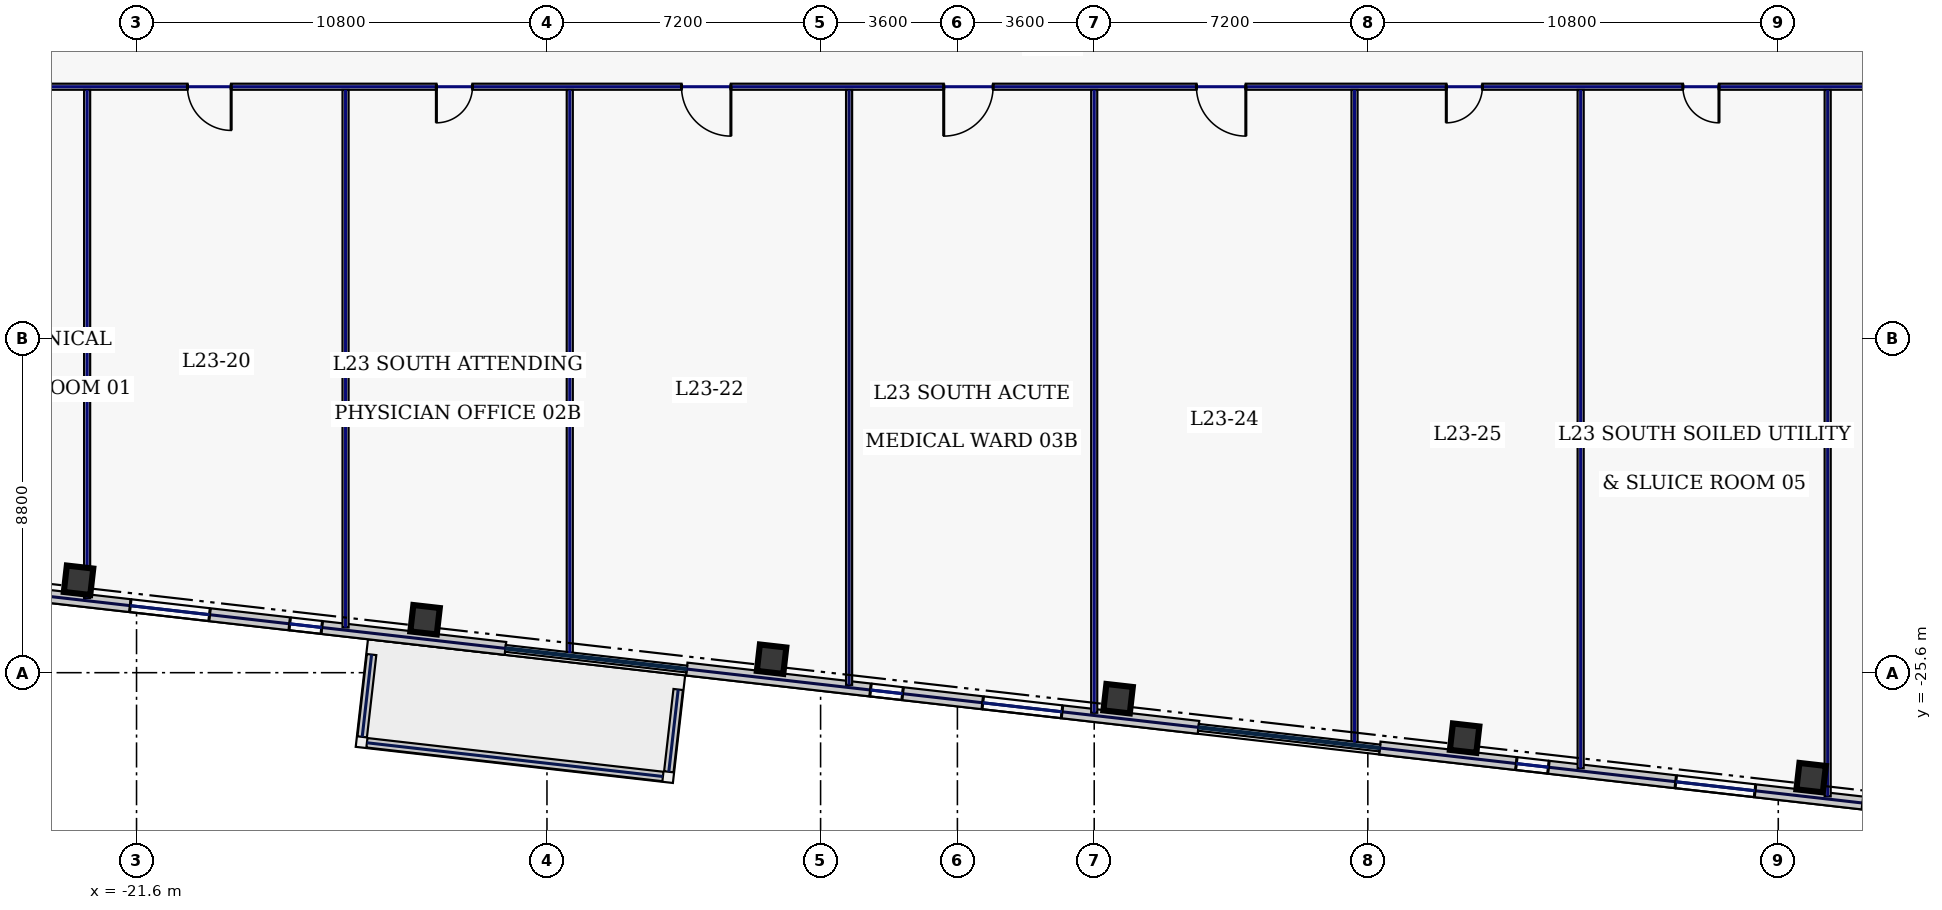
"""IFC4 building model, lengths in metres.
Left out: names, types, materials, properties, quantities, classifications, styles, units other than length and angle.
Written with IfcOpenShell. Run it as: python <this file> out.ifc"""

import sys

from ifc_helpers import new_model, si_unit, direction, frame, frame_2d, origin, origin_2d, place, context, subcontext, project, spatial, rectangle, hollow_rectangle, extrude, element, fill, save


model = new_model("IFC4")
c1 = context("Model", 3, precision=1e-05, world=origin(), true_north=direction((0.0, 1.0)))
c2 = subcontext(c1, "Body", "Model", "MODEL_VIEW")
j1 = project(units=[si_unit("LENGTHUNIT", "METRE"), si_unit("PLANEANGLEUNIT", "RADIAN")], contexts=[c1])
p1 = place(None, origin())
s1 = spatial("IfcSite", under=j1, at=p1, CompositionType="ELEMENT")
p2 = place(p1, origin())
s2 = spatial("IfcBuilding", under=s1, at=p2, CompositionType="ELEMENT")
p3 = place(p2, frame((0.0, 0.0, 105.4)))
s3 = spatial("IfcBuildingStorey", under=s2, at=p3, CompositionType="ELEMENT", Elevation=105.4)
for number, where, z_axis, x_axis in (
    (1, (-23.126, -23.168, 0.0), (0.0, 0.0, 1.0), (0.994, -0.113, 0.0)),
    (2, (-14.008, -24.207, 0.0), (0.0, 0.0, 1.0), (0.994, -0.113, 0.0)),
    (3, (-4.89, -25.246, 0.0), (0.0, 0.0, 1.0), (0.994, -0.113, 0.0)),
    (4, (4.229, -26.284, 0.0), (0.0, 0.0, 1.0), (0.994, -0.113, 0.0)),
    (5, (13.347, -27.323, 0.0), (0.0, 0.0, 1.0), (0.994, -0.113, 0.0)),
    (6, (22.465, -28.362, 0.0), (0.0, 0.0, 1.0), (0.994, -0.113, 0.0)),
):
    element("IfcColumn", number, at=place(p3, frame(where, z_axis=z_axis, x_axis=x_axis)), inside=s3, PredefinedType="COLUMN", context=c2, shape_type="SweptSolid", body=[
        extrude(hollow_rectangle(XDim=0.7, YDim=0.7, WallThickness=0.032, at=origin_2d()), origin(), (0.0, 0.0, 1.0), 3.74),
    ])
p4 = place(p3, frame((-15.415, -25.123, 0.0), z_axis=(0.0, 0.0, 1.0), x_axis=(-0.113221265394, -0.993569798787, 0.0)))
e7 = element("IfcWall", 7, at=p4, inside=s3, PredefinedType="PARAPET", context=c2, shape_type="SweptSolid", body=[
    extrude(rectangle(XDim=2.18, YDim=0.25, at=frame_2d((1.09, 0.0))), origin(), (0.0, 0.0, 1.0), 1.15),
])
p5 = place(p3, frame((-15.538, -27.444, 0.0), z_axis=(0.0, 0.0, 1.0), x_axis=(0.993569156748, -0.113226899453, 0.0)))
e8 = element("IfcWall", 8, at=p5, inside=s3, PredefinedType="PARAPET", context=c2, shape_type="SweptSolid", body=[
    extrude(rectangle(XDim=7.84, YDim=0.25, at=frame_2d((3.92, 0.0))), origin(), (0.0, 0.0, 1.0), 1.15),
])
p6 = place(p3, frame((-7.594, -28.208, 0.0), z_axis=(0.0, 0.0, 1.0), x_axis=(0.113221265394, 0.993569798787, 0.0)))
e9 = element("IfcWall", 9, at=p6, inside=s3, PredefinedType="PARAPET", context=c2, shape_type="SweptSolid", body=[
    extrude(rectangle(XDim=2.18, YDim=0.25, at=frame_2d((1.09, 0.0))), origin(), (0.0, 0.0, 1.0), 1.15),
])
p7 = place(p3, frame((-32.977, -22.559, 0.0), z_axis=(0.0, 0.0, 1.0), x_axis=(0.993571214605, -0.113208840243, 0.0)))
e10 = element("IfcWall", 10, at=p7, inside=s3, PredefinedType="STANDARD", context=c2, shape_type="SweptSolid", body=[
    extrude(rectangle(XDim=21.223, YDim=0.34, at=frame_2d((10.611, 0.0))), origin(), (0.0, 0.0, 1.0), 3.74),
])
p8 = place(p7, frame((2.108, 0.0, 0.67)))
e11 = element("IfcOpeningElement", 11, at=p8, cuts=e10, PredefinedType="OPENING", context=c2, shape_type="SweptSolid", body=[
    extrude(rectangle(XDim=2.1, YDim=2.2, at=frame_2d((1.05, 1.1))), frame((0.0, 0.18, 0.0), z_axis=(0.0, -1.0, 0.0), x_axis=(1.0, 0.0, 0.0)), (0.0, 0.0, 1.0), 0.36),
])
p9 = place(p7, frame((6.329, 0.0, 0.67)))
e12 = element("IfcOpeningElement", 12, at=p9, cuts=e10, PredefinedType="OPENING", context=c2, shape_type="SweptSolid", body=[
    extrude(rectangle(XDim=2.1, YDim=2.2, at=frame_2d((1.05, 1.1))), frame((0.0, 0.18, 0.0), z_axis=(0.0, -1.0, 0.0), x_axis=(1.0, 0.0, 0.0)), (0.0, 0.0, 1.0), 0.36),
])
p10 = place(p7, frame((11.285, 0.0, 0.67)))
e13 = element("IfcOpeningElement", 13, at=p10, cuts=e10, PredefinedType="OPENING", context=c2, shape_type="SweptSolid", body=[
    extrude(rectangle(XDim=2.1, YDim=2.2, at=frame_2d((1.05, 1.1))), frame((0.0, 0.18, 0.0), z_axis=(0.0, -1.0, 0.0), x_axis=(1.0, 0.0, 0.0)), (0.0, 0.0, 1.0), 0.36),
])
p11 = place(p7, frame((15.506, 0.0, 0.67)))
e14 = element("IfcOpeningElement", 14, at=p11, cuts=e10, PredefinedType="OPENING", context=c2, shape_type="SweptSolid", body=[
    extrude(rectangle(XDim=0.85, YDim=1.85, at=frame_2d((0.425, 0.925))), frame((0.0, 0.18, 0.0), z_axis=(0.0, -1.0, 0.0), x_axis=(1.0, 0.0, 0.0)), (0.0, 0.0, 1.0), 0.36),
])
p12 = place(p3, frame((-7.122, -25.504, 0.0), z_axis=(0.0, 0.0, 1.0), x_axis=(0.993571685551, -0.11320470693, 0.0)))
e15 = element("IfcWall", 15, at=p12, inside=s3, PredefinedType="STANDARD", context=c2, shape_type="SweptSolid", body=[
    extrude(rectangle(XDim=13.554, YDim=0.34, at=frame_2d((6.777, 0.0))), origin(), (0.0, 0.0, 1.0), 3.74),
])
p13 = place(p12, frame((4.866, 0.0, 0.67)))
e16 = element("IfcOpeningElement", 16, at=p13, cuts=e15, PredefinedType="OPENING", context=c2, shape_type="SweptSolid", body=[
    extrude(rectangle(XDim=0.85, YDim=1.85, at=frame_2d((0.425, 0.925))), frame((0.0, 0.18, 0.0), z_axis=(0.0, -1.0, 0.0), x_axis=(1.0, 0.0, 0.0)), (0.0, 0.0, 1.0), 0.36),
])
p14 = place(p12, frame((7.838, 0.0, 0.67)))
e17 = element("IfcOpeningElement", 17, at=p14, cuts=e15, PredefinedType="OPENING", context=c2, shape_type="SweptSolid", body=[
    extrude(rectangle(XDim=2.1, YDim=2.2, at=frame_2d((1.05, 1.1))), frame((0.0, 0.18, 0.0), z_axis=(0.0, -1.0, 0.0), x_axis=(1.0, 0.0, 0.0)), (0.0, 0.0, 1.0), 0.36),
])
p15 = place(p3, frame((11.115, -27.582, 0.0), z_axis=(0.0, 0.0, 1.0), x_axis=(0.993572655904, -0.113196190044, 0.0)))
e18 = element("IfcWall", 18, at=p15, inside=s3, PredefinedType="STANDARD", context=c2, shape_type="SweptSolid", body=[
    extrude(rectangle(XDim=21.223, YDim=0.34, at=frame_2d((10.611, 0.0))), origin(), (0.0, 0.0, 1.0), 3.74),
])
p16 = place(p15, frame((3.616, 0.0, 0.67)))
e19 = element("IfcOpeningElement", 19, at=p16, cuts=e18, PredefinedType="OPENING", context=c2, shape_type="SweptSolid", body=[
    extrude(rectangle(XDim=0.85, YDim=1.85, at=frame_2d((0.425, 0.925))), frame((0.0, 0.18, 0.0), z_axis=(0.0, -1.0, 0.0), x_axis=(1.0, 0.0, 0.0)), (0.0, 0.0, 1.0), 0.36),
])
p17 = place(p15, frame((7.838, 0.0, 0.67)))
e20 = element("IfcOpeningElement", 20, at=p17, cuts=e18, PredefinedType="OPENING", context=c2, shape_type="SweptSolid", body=[
    extrude(rectangle(XDim=2.1, YDim=2.2, at=frame_2d((1.05, 1.1))), frame((0.0, 0.18, 0.0), z_axis=(0.0, -1.0, 0.0), x_axis=(1.0, 0.0, 0.0)), (0.0, 0.0, 1.0), 0.36),
])
p18 = place(p15, frame((12.794, 0.0, 0.67)))
e21 = element("IfcOpeningElement", 21, at=p18, cuts=e18, PredefinedType="OPENING", context=c2, shape_type="SweptSolid", body=[
    extrude(rectangle(XDim=2.1, YDim=2.2, at=frame_2d((1.05, 1.1))), frame((0.0, 0.18, 0.0), z_axis=(0.0, -1.0, 0.0), x_axis=(1.0, 0.0, 0.0)), (0.0, 0.0, 1.0), 0.36),
])
p19 = place(p15, frame((17.265, 0.0, 0.22)))
e22 = element("IfcOpeningElement", 22, at=p19, cuts=e18, PredefinedType="OPENING", context=c2, shape_type="SweptSolid", body=[
    extrude(rectangle(XDim=1.6, YDim=1.2, at=frame_2d((0.8, 0.6))), frame((0.0, 0.18, 0.0), z_axis=(0.0, -1.0, 0.0), x_axis=(1.0, 0.0, 0.0)), (0.0, 0.0, 1.0), 0.36),
])
p20 = place(p3, frame((27.465, -10.18, 0.0), z_axis=(0.0, 0.0, 1.0), x_axis=(-1.0, 0.0, 0.0)))
e23 = element("IfcWall", 23, at=p20, inside=s3, PredefinedType="PARTITIONING", context=c2, shape_type="SweptSolid", body=[
    extrude(rectangle(XDim=54.93, YDim=0.16, at=frame_2d((27.465, 0.0))), origin(), (0.0, 0.0, 1.0), 3.74),
])
p21 = place(p20, frame((52.106, 0.0, 0.0)))
e24 = element("IfcOpeningElement", 24, at=p21, cuts=e23, PredefinedType="OPENING", context=c2, shape_type="SweptSolid", body=[
    extrude(rectangle(XDim=0.95, YDim=2.2, at=frame_2d((0.475, 1.1))), frame((0.0, 0.09, 0.0), z_axis=(0.0, -1.0, 0.0), x_axis=(1.0, 0.0, 0.0)), (0.0, 0.0, 1.0), 0.18),
])
p22 = place(p20, frame((46.575, 0.0, 0.0)))
e25 = element("IfcOpeningElement", 25, at=p22, cuts=e23, PredefinedType="OPENING", context=c2, shape_type="SweptSolid", body=[
    extrude(rectangle(XDim=1.15, YDim=2.2, at=frame_2d((0.575, 1.1))), frame((0.0, 0.09, 0.0), z_axis=(0.0, -1.0, 0.0), x_axis=(1.0, 0.0, 0.0)), (0.0, 0.0, 1.0), 0.18),
])
p23 = place(p20, frame((40.225, 0.0, 0.0)))
e26 = element("IfcOpeningElement", 26, at=p23, cuts=e23, PredefinedType="OPENING", context=c2, shape_type="SweptSolid", body=[
    extrude(rectangle(XDim=0.95, YDim=2.2, at=frame_2d((0.475, 1.1))), frame((0.0, 0.09, 0.0), z_axis=(0.0, -1.0, 0.0), x_axis=(1.0, 0.0, 0.0)), (0.0, 0.0, 1.0), 0.18),
])
p24 = place(p20, frame((33.425, 0.0, 0.0)))
e27 = element("IfcOpeningElement", 27, at=p24, cuts=e23, PredefinedType="OPENING", context=c2, shape_type="SweptSolid", body=[
    extrude(rectangle(XDim=1.3, YDim=2.2, at=frame_2d((0.65, 1.1))), frame((0.0, 0.09, 0.0), z_axis=(0.0, -1.0, 0.0), x_axis=(1.0, 0.0, 0.0)), (0.0, 0.0, 1.0), 0.18),
])
p25 = place(p20, frame((26.525, 0.0, 0.0)))
e28 = element("IfcOpeningElement", 28, at=p25, cuts=e23, PredefinedType="OPENING", context=c2, shape_type="SweptSolid", body=[
    extrude(rectangle(XDim=1.3, YDim=2.2, at=frame_2d((0.65, 1.1))), frame((0.0, 0.09, 0.0), z_axis=(0.0, -1.0, 0.0), x_axis=(1.0, 0.0, 0.0)), (0.0, 0.0, 1.0), 0.18),
])
p26 = place(p20, frame((19.875, 0.0, 0.0)))
e29 = element("IfcOpeningElement", 29, at=p26, cuts=e23, PredefinedType="OPENING", context=c2, shape_type="SweptSolid", body=[
    extrude(rectangle(XDim=1.3, YDim=2.2, at=frame_2d((0.65, 1.1))), frame((0.0, 0.09, 0.0), z_axis=(0.0, -1.0, 0.0), x_axis=(1.0, 0.0, 0.0)), (0.0, 0.0, 1.0), 0.18),
])
p27 = place(p20, frame((13.65, 0.0, 0.0)))
e30 = element("IfcOpeningElement", 30, at=p27, cuts=e23, PredefinedType="OPENING", context=c2, shape_type="SweptSolid", body=[
    extrude(rectangle(XDim=0.95, YDim=2.2, at=frame_2d((0.475, 1.1))), frame((0.0, 0.09, 0.0), z_axis=(0.0, -1.0, 0.0), x_axis=(1.0, 0.0, 0.0)), (0.0, 0.0, 1.0), 0.18),
])
p28 = place(p20, frame((7.425, 0.0, 0.0)))
e31 = element("IfcOpeningElement", 31, at=p28, cuts=e23, PredefinedType="OPENING", context=c2, shape_type="SweptSolid", body=[
    extrude(rectangle(XDim=0.95, YDim=2.2, at=frame_2d((0.475, 1.1))), frame((0.0, 0.09, 0.0), z_axis=(0.0, -1.0, 0.0), x_axis=(1.0, 0.0, 0.0)), (0.0, 0.0, 1.0), 0.18),
])
p29 = place(p20, frame((2.044, 0.0, 0.0)))
e32 = element("IfcOpeningElement", 32, at=p29, cuts=e23, PredefinedType="OPENING", context=c2, shape_type="SweptSolid", body=[
    extrude(rectangle(XDim=1.15, YDim=2.2, at=frame_2d((0.575, 1.1))), frame((0.0, 0.09, 0.0), z_axis=(0.0, -1.0, 0.0), x_axis=(1.0, 0.0, 0.0)), (0.0, 0.0, 1.0), 0.18),
])
p30 = place(p3, frame((-22.9, -23.636, 0.0), z_axis=(0.0, 0.0, 1.0), x_axis=(0.0, 1.0, 0.0)))
e33 = element("IfcWall", 33, at=p30, inside=s3, PredefinedType="PARTITIONING", context=c2, shape_type="SweptSolid", body=[
    extrude(rectangle(XDim=13.371, YDim=0.16, at=frame_2d((6.686, 0.0))), origin(), (0.0, 0.0, 1.0), 3.74),
])
p31 = place(p3, frame((-10.2, -25.083, 0.0), z_axis=(0.0, 0.0, 1.0), x_axis=(0.0, 1.0, 0.0)))
e34 = element("IfcWall", 34, at=p31, inside=s3, PredefinedType="PARTITIONING", context=c2, shape_type="SweptSolid", body=[
    extrude(rectangle(XDim=14.818, YDim=0.16, at=frame_2d((7.409, 0.0))), origin(), (0.0, 0.0, 1.0), 3.74),
])
p32 = place(p3, frame((3.6, -26.656, 0.0), z_axis=(0.0, 0.0, 1.0), x_axis=(0.0, 1.0, 0.0)))
e35 = element("IfcWall", 35, at=p32, inside=s3, PredefinedType="PARTITIONING", context=c2, shape_type="SweptSolid", body=[
    extrude(rectangle(XDim=16.391, YDim=0.16, at=frame_2d((8.195, 0.0))), origin(), (0.0, 0.0, 1.0), 3.74),
])
p33 = place(p3, frame((16.4, -28.114, 0.0), z_axis=(0.0, 0.0, 1.0), x_axis=(0.0, 1.0, 0.0)))
e36 = element("IfcWall", 36, at=p33, inside=s3, PredefinedType="PARTITIONING", context=c2, shape_type="SweptSolid", body=[
    extrude(rectangle(XDim=17.849, YDim=0.16, at=frame_2d((8.925, 0.0))), origin(), (0.0, 0.0, 1.0), 3.74),
])
p34 = place(p3, frame((22.9, -28.854, 0.0), z_axis=(0.0, 0.0, 1.0), x_axis=(0.0, 1.0, 0.0)))
e37 = element("IfcWall", 37, at=p34, inside=s3, PredefinedType="PARTITIONING", context=c2, shape_type="SweptSolid", body=[
    extrude(rectangle(XDim=18.59, YDim=0.16, at=frame_2d((9.295, 0.0))), origin(), (0.0, 0.0, 1.0), 3.235),
])
p35 = place(p3, frame((-16.1, -24.411, 0.0), z_axis=(0.0, 0.0, 1.0), x_axis=(0.0, 1.0, 0.0)))
e38 = element("IfcWall", 38, at=p35, inside=s3, PredefinedType="PARTITIONING", context=c2, shape_type="SweptSolid", body=[
    extrude(rectangle(XDim=14.146, YDim=0.16, at=frame_2d((7.073, 0.0))), origin(), (0.0, 0.0, 1.0), 3.74),
])
p36 = place(p3, frame((-2.85, -25.921, 0.0), z_axis=(0.0, 0.0, 1.0), x_axis=(0.0, 1.0, 0.0)))
e39 = element("IfcWall", 39, at=p36, inside=s3, PredefinedType="PARTITIONING", context=c2, shape_type="SweptSolid", body=[
    extrude(rectangle(XDim=15.656, YDim=0.16, at=frame_2d((7.828, 0.0))), origin(), (0.0, 0.0, 1.0), 3.165),
])
p37 = place(p3, frame((10.45, -27.436, 0.0), z_axis=(0.0, 0.0, 1.0), x_axis=(0.0, 1.0, 0.0)))
e40 = element("IfcWall", 40, at=p37, inside=s3, PredefinedType="PARTITIONING", context=c2, shape_type="SweptSolid", body=[
    extrude(rectangle(XDim=17.171, YDim=0.16, at=frame_2d((8.585, 0.0))), origin(), (0.0, 0.0, 1.0), 3.74),
])
p38 = place(p10, origin())
e41 = element("IfcWindow", 41, at=p38, inside=s3, PartitioningType="SINGLE_PANEL", PredefinedType="WINDOW", context=c2, shape_type="SweptSolid", body=[
    extrude(rectangle(XDim=2.1, YDim=2.2, at=frame_2d((1.05, 1.1))), frame((0.0, 0.03, 0.0), z_axis=(0.0, -1.0, 0.0), x_axis=(1.0, 0.0, 0.0)), (0.0, 0.0, 1.0), 0.06),
])
fill(e13, e41)
p39 = place(p11, origin())
e42 = element("IfcWindow", 42, at=p39, inside=s3, PartitioningType="SINGLE_PANEL", PredefinedType="WINDOW", context=c2, shape_type="SweptSolid", body=[
    extrude(rectangle(XDim=0.85, YDim=1.85, at=frame_2d((0.425, 0.925))), frame((0.0, 0.03, 0.0), z_axis=(0.0, -1.0, 0.0), x_axis=(1.0, 0.0, 0.0)), (0.0, 0.0, 1.0), 0.06),
])
fill(e14, e42)
p40 = place(p13, origin())
e43 = element("IfcWindow", 43, at=p40, inside=s3, PartitioningType="SINGLE_PANEL", PredefinedType="WINDOW", context=c2, shape_type="SweptSolid", body=[
    extrude(rectangle(XDim=0.85, YDim=1.85, at=frame_2d((0.425, 0.925))), frame((0.0, 0.03, 0.0), z_axis=(0.0, -1.0, 0.0), x_axis=(1.0, 0.0, 0.0)), (0.0, 0.0, 1.0), 0.06),
])
fill(e16, e43)
p41 = place(p14, origin())
e44 = element("IfcWindow", 44, at=p41, inside=s3, PartitioningType="SINGLE_PANEL", PredefinedType="WINDOW", context=c2, shape_type="SweptSolid", body=[
    extrude(rectangle(XDim=2.1, YDim=2.2, at=frame_2d((1.05, 1.1))), frame((0.0, 0.03, 0.0), z_axis=(0.0, -1.0, 0.0), x_axis=(1.0, 0.0, 0.0)), (0.0, 0.0, 1.0), 0.06),
])
fill(e17, e44)
p42 = place(p16, origin())
e45 = element("IfcWindow", 45, at=p42, inside=s3, PartitioningType="SINGLE_PANEL", PredefinedType="WINDOW", context=c2, shape_type="SweptSolid", body=[
    extrude(rectangle(XDim=0.85, YDim=1.85, at=frame_2d((0.425, 0.925))), frame((0.0, 0.03, 0.0), z_axis=(0.0, -1.0, 0.0), x_axis=(1.0, 0.0, 0.0)), (0.0, 0.0, 1.0), 0.06),
])
fill(e19, e45)
p43 = place(p17, origin())
e46 = element("IfcWindow", 46, at=p43, inside=s3, PartitioningType="SINGLE_PANEL", PredefinedType="WINDOW", context=c2, shape_type="SweptSolid", body=[
    extrude(rectangle(XDim=2.1, YDim=2.2, at=frame_2d((1.05, 1.1))), frame((0.0, 0.03, 0.0), z_axis=(0.0, -1.0, 0.0), x_axis=(1.0, 0.0, 0.0)), (0.0, 0.0, 1.0), 0.06),
])
fill(e20, e46)
p44 = place(p22, origin())
e47 = element("IfcDoor", 47, at=p44, inside=s3, OperationType="SINGLE_SWING_LEFT", PredefinedType="DOOR", context=c2, shape_type="SweptSolid", body=[
    extrude(rectangle(XDim=1.15, YDim=2.2, at=frame_2d((0.575, 1.1))), frame((0.0, 0.025, 0.0), z_axis=(0.0, -1.0, 0.0), x_axis=(1.0, 0.0, 0.0)), (0.0, 0.0, 1.0), 0.05),
])
fill(e25, e47)
p45 = place(p23, origin())
e48 = element("IfcDoor", 48, at=p45, inside=s3, OperationType="SINGLE_SWING_RIGHT", PredefinedType="DOOR", context=c2, shape_type="SweptSolid", body=[
    extrude(rectangle(XDim=0.95, YDim=2.2, at=frame_2d((0.475, 1.1))), frame((0.0, 0.025, 0.0), z_axis=(0.0, -1.0, 0.0), x_axis=(1.0, 0.0, 0.0)), (0.0, 0.0, 1.0), 0.05),
])
fill(e26, e48)
p46 = place(p24, origin())
e49 = element("IfcDoor", 49, at=p46, inside=s3, OperationType="SINGLE_SWING_LEFT", PredefinedType="DOOR", context=c2, shape_type="SweptSolid", body=[
    extrude(rectangle(XDim=1.3, YDim=2.2, at=frame_2d((0.65, 1.1))), frame((0.0, 0.025, 0.0), z_axis=(0.0, -1.0, 0.0), x_axis=(1.0, 0.0, 0.0)), (0.0, 0.0, 1.0), 0.05),
])
fill(e27, e49)
p47 = place(p25, origin())
e50 = element("IfcDoor", 50, at=p47, inside=s3, OperationType="SINGLE_SWING_RIGHT", PredefinedType="DOOR", context=c2, shape_type="SweptSolid", body=[
    extrude(rectangle(XDim=1.3, YDim=2.2, at=frame_2d((0.65, 1.1))), frame((0.0, 0.025, 0.0), z_axis=(0.0, -1.0, 0.0), x_axis=(1.0, 0.0, 0.0)), (0.0, 0.0, 1.0), 0.05),
])
fill(e28, e50)
p48 = place(p26, origin())
e51 = element("IfcDoor", 51, at=p48, inside=s3, OperationType="SINGLE_SWING_LEFT", PredefinedType="DOOR", context=c2, shape_type="SweptSolid", body=[
    extrude(rectangle(XDim=1.3, YDim=2.2, at=frame_2d((0.65, 1.1))), frame((0.0, 0.025, 0.0), z_axis=(0.0, -1.0, 0.0), x_axis=(1.0, 0.0, 0.0)), (0.0, 0.0, 1.0), 0.05),
])
fill(e29, e51)
p49 = place(p27, origin())
e52 = element("IfcDoor", 52, at=p49, inside=s3, OperationType="SINGLE_SWING_RIGHT", PredefinedType="DOOR", context=c2, shape_type="SweptSolid", body=[
    extrude(rectangle(XDim=0.95, YDim=2.2, at=frame_2d((0.475, 1.1))), frame((0.0, 0.025, 0.0), z_axis=(0.0, -1.0, 0.0), x_axis=(1.0, 0.0, 0.0)), (0.0, 0.0, 1.0), 0.05),
])
fill(e30, e52)
p50 = place(p28, origin())
e53 = element("IfcDoor", 53, at=p50, inside=s3, OperationType="SINGLE_SWING_LEFT", PredefinedType="DOOR", context=c2, shape_type="SweptSolid", body=[
    extrude(rectangle(XDim=0.95, YDim=2.2, at=frame_2d((0.475, 1.1))), frame((0.0, 0.025, 0.0), z_axis=(0.0, -1.0, 0.0), x_axis=(1.0, 0.0, 0.0)), (0.0, 0.0, 1.0), 0.05),
])
fill(e31, e53)
save(model, sys.argv[1])
